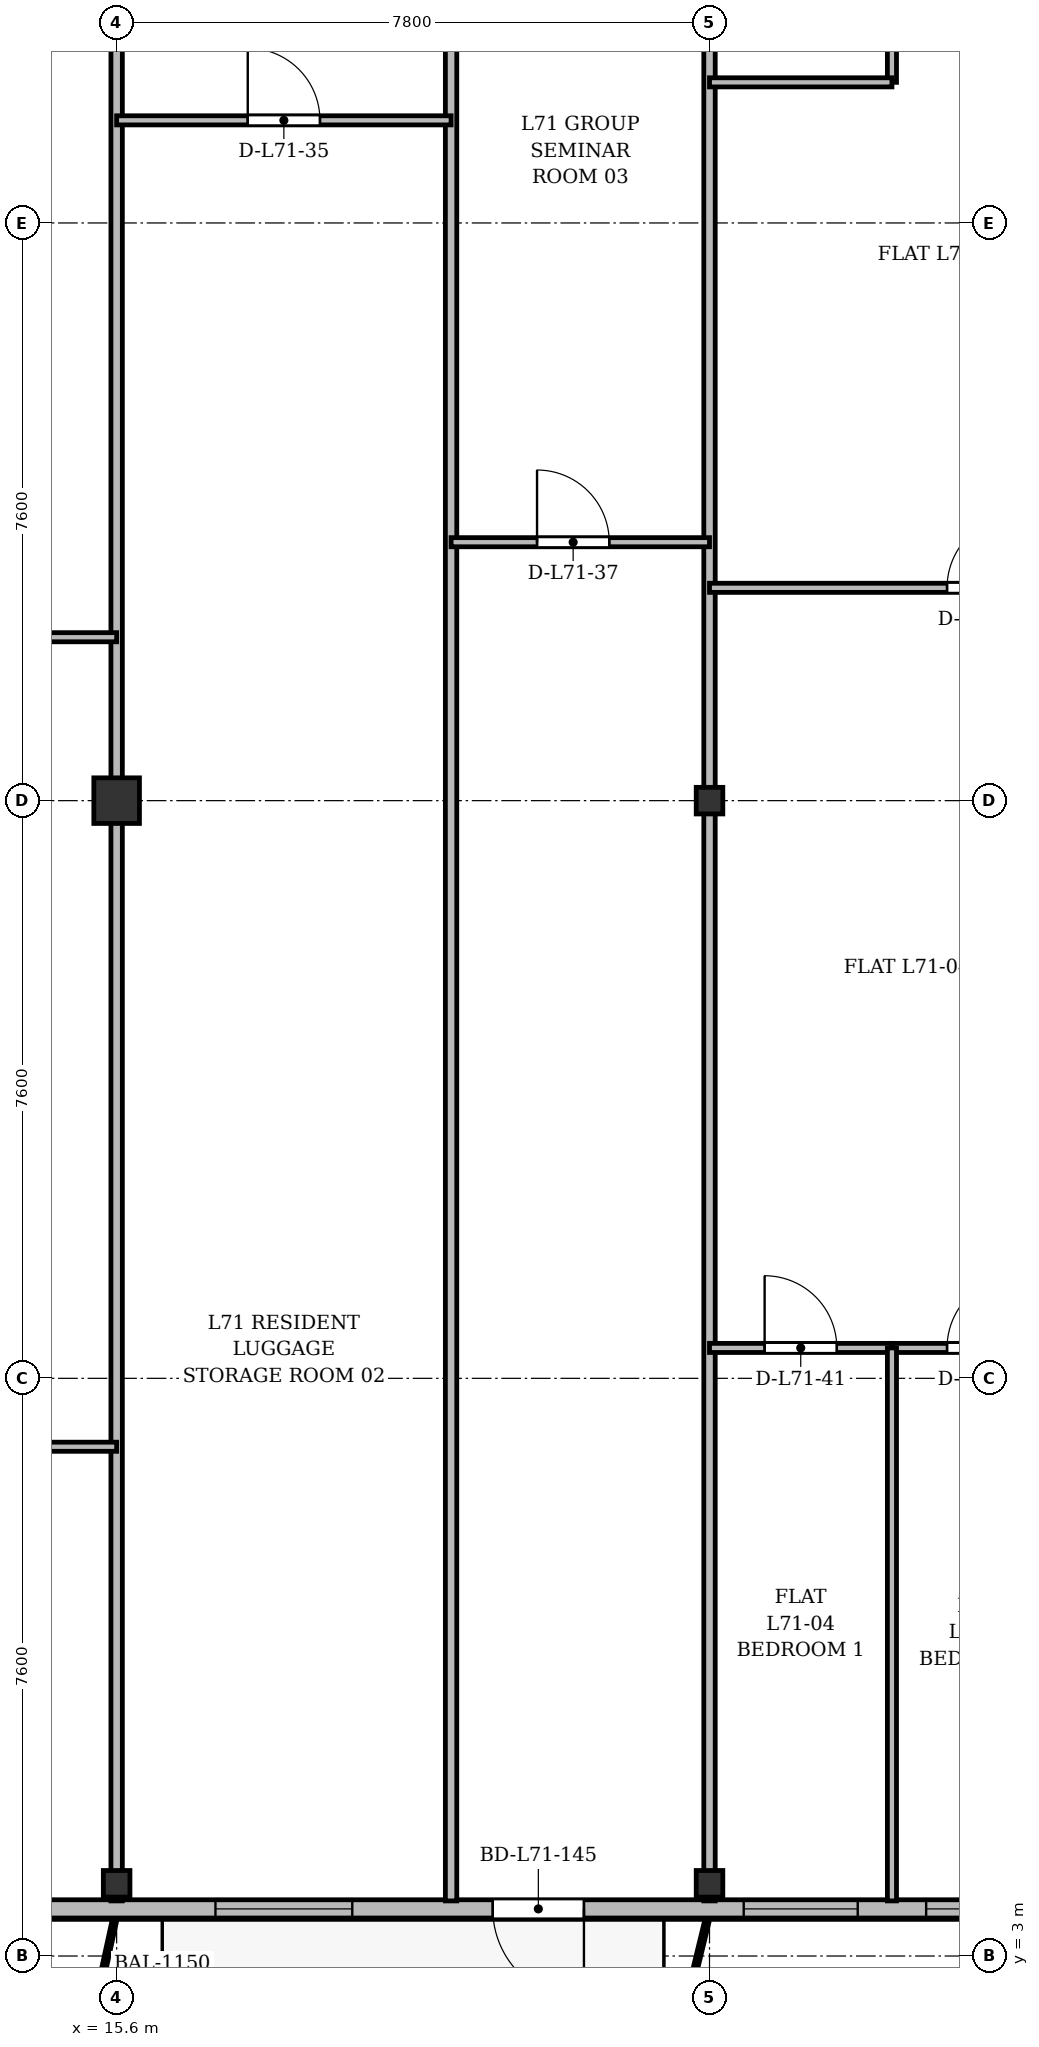
"""IFC4 building model, lengths in metres.
Left out: names, types, materials, properties, quantities, classifications, styles, units other than length and angle.
Written with IfcOpenShell. Run it as: python <this file> out.ifc"""

import sys

from ifc_helpers import new_model, si_unit, direction, frame, frame_2d, origin, origin_2d, place, context, subcontext, project, spatial, rectangle, i_section, extrude, source, transform, mapped, element, fill, save


model = new_model("IFC4")
c1 = context("Model", 3, precision=1e-05, world=origin(), true_north=direction((0.0, 1.0)))
c2 = subcontext(c1, "Body", "Model", "MODEL_VIEW")
j1 = project(units=[si_unit("LENGTHUNIT", "METRE"), si_unit("PLANEANGLEUNIT", "RADIAN")], contexts=[c1])
p1 = place(None, origin())
s1 = spatial("IfcSite", under=j1, at=p1, CompositionType="ELEMENT")
p2 = place(p1, origin())
s2 = spatial("IfcBuilding", under=s1, at=p2, CompositionType="ELEMENT")
p3 = place(p2, frame((0.0, 0.0, 273.9)))
s3 = spatial("IfcBuildingStorey", under=s2, at=p3, CompositionType="ELEMENT", Elevation=273.9)
m1 = source(origin(), c2, "Body", "SweptSolid", [
    extrude(i_section(OverallWidth=0.35, OverallDepth=0.35, WebThickness=0.018, FlangeThickness=0.028, at=origin_2d()), origin(), (0.0, 0.0, 1.0), 3.6),
])
p4 = place(p3, frame((15.6, 3.95, 0.0), z_axis=(0.0, 0.0, 1.0), x_axis=(1.0, 0.0, 0.0)))
e1 = element("IfcColumn", 1, at=p4, inside=s3, PredefinedType="COLUMN", context=c2, shape_type="MappedRepresentation", body=[
    mapped(m1, transform((0.0, 0.0, 0.0), x_axis=(1.0, 0.0, 0.0), y_axis=(0.0, 1.0, 0.0), z_axis=(0.0, 0.0, 1.0), scale=1.0)),
])
m2 = source(origin(), c2, "Body", "SweptSolid", [
    extrude(rectangle(XDim=0.6, YDim=0.6, at=origin_2d()), origin(), (0.0, 0.0, 1.0), 3.6),
])
p5 = place(p3, frame((15.6, 18.2, 0.0), z_axis=(0.0, 0.0, 1.0), x_axis=(1.0, 0.0, 0.0)))
e2 = element("IfcColumn", 2, at=p5, inside=s3, PredefinedType="COLUMN", context=c2, shape_type="MappedRepresentation", body=[
    mapped(m2, transform((0.0, 0.0, 0.0), x_axis=(1.0, 0.0, 0.0), y_axis=(0.0, 1.0, 0.0), z_axis=(0.0, 0.0, 1.0), scale=1.0)),
])
for number, where, z_axis, x_axis in (
    (3, (23.4, 3.95, 0.0), (0.0, 0.0, 1.0), (1.0, 0.0, 0.0)),
    (4, (23.4, 18.2, 0.0), (0.0, 0.0, 1.0), (1.0, 0.0, 0.0)),
):
    element("IfcColumn", number, at=place(p3, frame(where, z_axis=z_axis, x_axis=x_axis)), inside=s3, PredefinedType="COLUMN", context=c2, shape_type="MappedRepresentation", body=[
        mapped(m1, transform((0.0, 0.0, 0.0), x_axis=(1.0, 0.0, 0.0), y_axis=(0.0, 1.0, 0.0), z_axis=(0.0, 0.0, 1.0), scale=1.0)),
    ])
p6 = place(p3, frame((63.2, 3.62, 0.0), z_axis=(0.0, 0.0, 1.0), x_axis=(-1.0, 0.0, 0.0)))
e5 = element("IfcWall", 5, at=p6, inside=s3, PredefinedType="SOLIDWALL", context=c2, shape_type="SweptSolid", body=[
    extrude(rectangle(XDim=52.0, YDim=0.24, at=frame_2d((26.0, 0.0))), origin(), (0.0, 0.0, 1.0), 3.37),
])
p7 = place(p6, frame((1.145, 0.0, 0.9)))
e6 = element("IfcOpeningElement", 6, at=p7, cuts=e5, PredefinedType="OPENING", context=c2, shape_type="SweptSolid", body=[
    extrude(rectangle(XDim=2.2, YDim=1.8, at=frame_2d((1.1, 0.9))), frame((0.0, 0.13, 0.0), z_axis=(0.0, -1.0, 0.0), x_axis=(1.0, 0.0, 0.0)), (0.0, 0.0, 1.0), 0.26),
])
p8 = place(p6, frame((5.45, 0.0, 0.9)))
e7 = element("IfcOpeningElement", 7, at=p8, cuts=e5, PredefinedType="OPENING", context=c2, shape_type="SweptSolid", body=[
    extrude(rectangle(XDim=1.5, YDim=1.75, at=frame_2d((0.75, 0.875))), frame((0.0, 0.13, 0.0), z_axis=(0.0, -1.0, 0.0), x_axis=(1.0, 0.0, 0.0)), (0.0, 0.0, 1.0), 0.26),
])
p9 = place(p6, frame((9.1, 0.0, 0.9)))
e8 = element("IfcOpeningElement", 8, at=p9, cuts=e5, PredefinedType="OPENING", context=c2, shape_type="SweptSolid", body=[
    extrude(rectangle(XDim=2.0, YDim=1.95, at=frame_2d((1.0, 0.975))), frame((0.0, 0.13, 0.0), z_axis=(0.0, -1.0, 0.0), x_axis=(1.0, 0.0, 0.0)), (0.0, 0.0, 1.0), 0.26),
])
p10 = place(p6, frame((14.017, 0.0, 0.0)))
e9 = element("IfcOpeningElement", 9, at=p10, cuts=e5, PredefinedType="OPENING", context=c2, shape_type="SweptSolid", body=[
    extrude(rectangle(XDim=1.2, YDim=2.2, at=frame_2d((0.6, 1.1))), frame((0.0, 0.13, 0.0), z_axis=(0.0, -1.0, 0.0), x_axis=(1.0, 0.0, 0.0)), (0.0, 0.0, 1.0), 0.26),
])
p11 = place(p6, frame((25.1, 0.0, 0.9)))
e10 = element("IfcOpeningElement", 10, at=p11, cuts=e5, PredefinedType="OPENING", context=c2, shape_type="SweptSolid", body=[
    extrude(rectangle(XDim=1.8, YDim=1.8, at=frame_2d((0.9, 0.9))), frame((0.0, 0.13, 0.0), z_axis=(0.0, -1.0, 0.0), x_axis=(1.0, 0.0, 0.0)), (0.0, 0.0, 1.0), 0.26),
])
p12 = place(p6, frame((33.05, 0.0, 0.9)))
e11 = element("IfcOpeningElement", 11, at=p12, cuts=e5, PredefinedType="OPENING", context=c2, shape_type="SweptSolid", body=[
    extrude(rectangle(XDim=1.5, YDim=1.75, at=frame_2d((0.75, 0.875))), frame((0.0, 0.13, 0.0), z_axis=(0.0, -1.0, 0.0), x_axis=(1.0, 0.0, 0.0)), (0.0, 0.0, 1.0), 0.26),
])
p13 = place(p6, frame((35.45, 0.0, 0.9)))
e12 = element("IfcOpeningElement", 12, at=p13, cuts=e5, PredefinedType="OPENING", context=c2, shape_type="SweptSolid", body=[
    extrude(rectangle(XDim=1.5, YDim=1.75, at=frame_2d((0.75, 0.875))), frame((0.0, 0.13, 0.0), z_axis=(0.0, -1.0, 0.0), x_axis=(1.0, 0.0, 0.0)), (0.0, 0.0, 1.0), 0.26),
])
p14 = place(p6, frame((37.85, 0.0, 0.9)))
e13 = element("IfcOpeningElement", 13, at=p14, cuts=e5, PredefinedType="OPENING", context=c2, shape_type="SweptSolid", body=[
    extrude(rectangle(XDim=1.5, YDim=1.75, at=frame_2d((0.75, 0.875))), frame((0.0, 0.13, 0.0), z_axis=(0.0, -1.0, 0.0), x_axis=(1.0, 0.0, 0.0)), (0.0, 0.0, 1.0), 0.26),
])
p15 = place(p6, frame((41.452, 0.0, 0.0)))
e14 = element("IfcOpeningElement", 14, at=p15, cuts=e5, PredefinedType="OPENING", context=c2, shape_type="SweptSolid", body=[
    extrude(rectangle(XDim=1.2, YDim=2.2, at=frame_2d((0.6, 1.1))), frame((0.0, 0.13, 0.0), z_axis=(0.0, -1.0, 0.0), x_axis=(1.0, 0.0, 0.0)), (0.0, 0.0, 1.0), 0.26),
])
p16 = place(p6, frame((44.5, 0.0, 0.9)))
e15 = element("IfcOpeningElement", 15, at=p16, cuts=e5, PredefinedType="OPENING", context=c2, shape_type="SweptSolid", body=[
    extrude(rectangle(XDim=1.8, YDim=1.8, at=frame_2d((0.9, 0.9))), frame((0.0, 0.13, 0.0), z_axis=(0.0, -1.0, 0.0), x_axis=(1.0, 0.0, 0.0)), (0.0, 0.0, 1.0), 0.26),
])
p17 = place(p6, frame((48.655, 0.0, 0.9)))
e16 = element("IfcOpeningElement", 16, at=p17, cuts=e5, PredefinedType="OPENING", context=c2, shape_type="SweptSolid", body=[
    extrude(rectangle(XDim=2.2, YDim=1.8, at=frame_2d((1.1, 0.9))), frame((0.0, 0.13, 0.0), z_axis=(0.0, -1.0, 0.0), x_axis=(1.0, 0.0, 0.0)), (0.0, 0.0, 1.0), 0.26),
])
p18 = place(p3, frame((15.6, 3.725, 0.0), z_axis=(0.0, 0.0, 1.0), x_axis=(0.0, 1.0, 0.0)))
e17 = element("IfcWall", 17, at=p18, inside=s3, PredefinedType="PARTITIONING", context=c2, shape_type="SweptSolid", body=[
    extrude(rectangle(XDim=27.275, YDim=0.15, at=frame_2d((13.637, 0.0))), origin(), (0.0, 0.0, 1.0), 2.87),
])
p19 = place(p3, frame((20.0, 3.725, 0.0), z_axis=(0.0, 0.0, 1.0), x_axis=(0.0, 1.0, 0.0)))
e18 = element("IfcWall", 18, at=p19, inside=s3, PredefinedType="PARTITIONING", context=c2, shape_type="SweptSolid", body=[
    extrude(rectangle(XDim=27.275, YDim=0.15, at=frame_2d((13.637, 0.0))), origin(), (0.0, 0.0, 1.0), 2.92),
])
p20 = place(p3, frame((23.4, 3.725, 0.0), z_axis=(0.0, 0.0, 1.0), x_axis=(0.0, 1.0, 0.0)))
e19 = element("IfcWall", 19, at=p20, inside=s3, PredefinedType="PARTITIONING", context=c2, shape_type="SweptSolid", body=[
    extrude(rectangle(XDim=27.275, YDim=0.15, at=frame_2d((13.637, 0.0))), origin(), (0.0, 0.0, 1.0), 2.87),
])
p21 = place(p3, frame((8.44, 20.35, 0.0), z_axis=(0.0, 0.0, 1.0), x_axis=(1.0, 0.0, 0.0)))
e20 = element("IfcWall", 20, at=p21, inside=s3, PredefinedType="PARTITIONING", context=c2, shape_type="SweptSolid", body=[
    extrude(rectangle(XDim=7.16, YDim=0.12, at=frame_2d((3.58, 0.0))), origin(), (0.0, 0.0, 1.0), 2.87),
])
p22 = place(p21, frame((3.105, 0.0, 0.0)))
e21 = element("IfcOpeningElement", 21, at=p22, cuts=e20, PredefinedType="OPENING", context=c2, shape_type="SweptSolid", body=[
    extrude(rectangle(XDim=0.95, YDim=2.15, at=frame_2d((0.475, 1.075))), frame((0.0, 0.07, 0.0), z_axis=(0.0, -1.0, 0.0), x_axis=(1.0, 0.0, 0.0)), (0.0, 0.0, 1.0), 0.14),
])
p23 = place(p3, frame((8.44, 9.7, 0.0), z_axis=(0.0, 0.0, 1.0), x_axis=(1.0, 0.0, 0.0)))
e22 = element("IfcWall", 22, at=p23, inside=s3, PredefinedType="PARTITIONING", context=c2, shape_type="SweptSolid", body=[
    extrude(rectangle(XDim=7.16, YDim=0.12, at=frame_2d((3.58, 0.0))), origin(), (0.0, 0.0, 1.0), 2.87),
])
p24 = place(p23, frame((3.105, 0.0, 0.0)))
e23 = element("IfcOpeningElement", 23, at=p24, cuts=e22, PredefinedType="OPENING", context=c2, shape_type="SweptSolid", body=[
    extrude(rectangle(XDim=0.95, YDim=2.15, at=frame_2d((0.475, 1.075))), frame((0.0, 0.07, 0.0), z_axis=(0.0, -1.0, 0.0), x_axis=(1.0, 0.0, 0.0)), (0.0, 0.0, 1.0), 0.14),
])
p25 = place(p3, frame((15.6, 27.15, 0.0), z_axis=(0.0, 0.0, 1.0), x_axis=(1.0, 0.0, 0.0)))
e24 = element("IfcWall", 24, at=p25, inside=s3, PredefinedType="PARTITIONING", context=c2, shape_type="SweptSolid", body=[
    extrude(rectangle(XDim=4.4, YDim=0.12, at=frame_2d((2.2, 0.0))), origin(), (0.0, 0.0, 1.0), 2.87),
])
p26 = place(p25, frame((1.725, 0.0, 0.0)))
e25 = element("IfcOpeningElement", 25, at=p26, cuts=e24, PredefinedType="OPENING", context=c2, shape_type="SweptSolid", body=[
    extrude(rectangle(XDim=0.95, YDim=2.15, at=frame_2d((0.475, 1.075))), frame((0.0, 0.07, 0.0), z_axis=(0.0, -1.0, 0.0), x_axis=(1.0, 0.0, 0.0)), (0.0, 0.0, 1.0), 0.14),
])
p27 = place(p3, frame((20.0, 21.6, 0.0), z_axis=(0.0, 0.0, 1.0), x_axis=(1.0, 0.0, 0.0)))
e26 = element("IfcWall", 26, at=p27, inside=s3, PredefinedType="PARTITIONING", context=c2, shape_type="SweptSolid", body=[
    extrude(rectangle(XDim=3.4, YDim=0.12, at=frame_2d((1.7, 0.0))), origin(), (0.0, 0.0, 1.0), 2.87),
])
p28 = place(p27, frame((1.131, 0.0, 0.0)))
e27 = element("IfcOpeningElement", 27, at=p28, cuts=e26, PredefinedType="OPENING", context=c2, shape_type="SweptSolid", body=[
    extrude(rectangle(XDim=0.95, YDim=2.15, at=frame_2d((0.475, 1.075))), frame((0.0, 0.07, 0.0), z_axis=(0.0, -1.0, 0.0), x_axis=(1.0, 0.0, 0.0)), (0.0, 0.0, 1.0), 0.14),
])
p29 = place(p3, frame((23.4, 21.0, 0.0), z_axis=(0.0, 0.0, 1.0), x_axis=(1.0, 0.0, 0.0)))
e28 = element("IfcWall", 28, at=p29, inside=s3, PredefinedType="PARTITIONING", context=c2, shape_type="SweptSolid", body=[
    extrude(rectangle(XDim=7.2, YDim=0.12, at=frame_2d((3.6, 0.0))), origin(), (0.0, 0.0, 1.0), 2.87),
])
p30 = place(p29, frame((3.125, 0.0, 0.0)))
e29 = element("IfcOpeningElement", 29, at=p30, cuts=e28, PredefinedType="OPENING", context=c2, shape_type="SweptSolid", body=[
    extrude(rectangle(XDim=0.95, YDim=2.15, at=frame_2d((0.475, 1.075))), frame((0.0, 0.07, 0.0), z_axis=(0.0, -1.0, 0.0), x_axis=(1.0, 0.0, 0.0)), (0.0, 0.0, 1.0), 0.14),
])
p31 = place(p3, frame((25.8, 27.65, 0.0), z_axis=(0.0, 0.0, 1.0), x_axis=(0.0, 1.0, 0.0)))
e30 = element("IfcWall", 30, at=p31, inside=s3, PredefinedType="PARTITIONING", context=c2, shape_type="SweptSolid", body=[
    extrude(rectangle(XDim=3.35, YDim=0.12, at=frame_2d((1.675, 0.0))), origin(), (0.0, 0.0, 1.0), 3.37),
])
p32 = place(p31, frame((0.8, 0.0, 0.0)))
e31 = element("IfcOpeningElement", 31, at=p32, cuts=e30, PredefinedType="OPENING", context=c2, shape_type="SweptSolid", body=[
    extrude(rectangle(XDim=0.85, YDim=2.1, at=frame_2d((0.425, 1.05))), frame((0.0, 0.07, 0.0), z_axis=(0.0, -1.0, 0.0), x_axis=(1.0, 0.0, 0.0)), (0.0, 0.0, 1.0), 0.14),
])
p33 = place(p3, frame((23.4, 27.65, 0.0), z_axis=(0.0, 0.0, 1.0), x_axis=(1.0, 0.0, 0.0)))
e32 = element("IfcWall", 32, at=p33, inside=s3, PredefinedType="PARTITIONING", context=c2, shape_type="SweptSolid", body=[
    extrude(rectangle(XDim=2.4, YDim=0.12, at=frame_2d((1.2, 0.0))), origin(), (0.0, 0.0, 1.0), 2.87),
])
p34 = place(p3, frame((23.4, 11.0, 0.0), z_axis=(0.0, 0.0, 1.0), x_axis=(1.0, 0.0, 0.0)))
e33 = element("IfcWall", 33, at=p34, inside=s3, PredefinedType="PARTITIONING", context=c2, shape_type="SweptSolid", body=[
    extrude(rectangle(XDim=2.4, YDim=0.12, at=frame_2d((1.2, 0.0))), origin(), (0.0, 0.0, 1.0), 2.87),
])
p35 = place(p34, frame((0.725, 0.0, 0.0)))
e34 = element("IfcOpeningElement", 34, at=p35, cuts=e33, PredefinedType="OPENING", context=c2, shape_type="SweptSolid", body=[
    extrude(rectangle(XDim=0.95, YDim=2.15, at=frame_2d((0.475, 1.075))), frame((0.0, 0.07, 0.0), z_axis=(0.0, -1.0, 0.0), x_axis=(1.0, 0.0, 0.0)), (0.0, 0.0, 1.0), 0.14),
])
p36 = place(p3, frame((25.8, 11.0, 0.0), z_axis=(0.0, 0.0, 1.0), x_axis=(1.0, 0.0, 0.0)))
e35 = element("IfcWall", 35, at=p36, inside=s3, PredefinedType="PARTITIONING", context=c2, shape_type="SweptSolid", body=[
    extrude(rectangle(XDim=2.4, YDim=0.12, at=frame_2d((1.2, 0.0))), origin(), (0.0, 0.0, 1.0), 3.07),
])
p37 = place(p36, frame((0.725, 0.0, 0.0)))
e36 = element("IfcOpeningElement", 36, at=p37, cuts=e35, PredefinedType="OPENING", context=c2, shape_type="SweptSolid", body=[
    extrude(rectangle(XDim=0.95, YDim=2.15, at=frame_2d((0.475, 1.075))), frame((0.0, 0.07, 0.0), z_axis=(0.0, -1.0, 0.0), x_axis=(1.0, 0.0, 0.0)), (0.0, 0.0, 1.0), 0.14),
])
p38 = place(p3, frame((25.8, 3.725, 0.0), z_axis=(0.0, 0.0, 1.0), x_axis=(0.0, 1.0, 0.0)))
e37 = element("IfcWall", 37, at=p38, inside=s3, PredefinedType="PARTITIONING", context=c2, shape_type="SweptSolid", body=[
    extrude(rectangle(XDim=7.275, YDim=0.12, at=frame_2d((3.637, 0.0))), origin(), (0.0, 0.0, 1.0), 2.92),
])
m3 = source(origin(), c2, "Body", "SweptSolid", [
    extrude(rectangle(XDim=1.5, YDim=1.75, at=frame_2d((0.75, 0.875))), frame((0.0, 0.03, 0.0), z_axis=(0.0, -1.0, 0.0), x_axis=(1.0, 0.0, 0.0)), (0.0, 0.0, 1.0), 0.06),
])
p39 = place(p13, origin())
e38 = element("IfcWindow", 38, at=p39, inside=s3, PartitioningType="SINGLE_PANEL", PredefinedType="WINDOW", context=c2, shape_type="MappedRepresentation", body=[
    mapped(m3, transform((0.0, 0.0, 0.0), x_axis=(1.0, 0.0, 0.0), y_axis=(0.0, 1.0, 0.0), z_axis=(0.0, 0.0, 1.0), scale=1.0)),
])
fill(e12, e38)
p40 = place(p14, origin())
e39 = element("IfcWindow", 39, at=p40, inside=s3, PartitioningType="SINGLE_PANEL", PredefinedType="WINDOW", context=c2, shape_type="MappedRepresentation", body=[
    mapped(m3, transform((0.0, 0.0, 0.0), x_axis=(1.0, 0.0, 0.0), y_axis=(0.0, 1.0, 0.0), z_axis=(0.0, 0.0, 1.0), scale=1.0)),
])
fill(e13, e39)
m4 = source(origin(), c2, "Body", "SweptSolid", [
    extrude(rectangle(XDim=1.2, YDim=2.2, at=frame_2d((0.6, 1.1))), frame((0.0, 0.025, 0.0), z_axis=(0.0, -1.0, 0.0), x_axis=(1.0, 0.0, 0.0)), (0.0, 0.0, 1.0), 0.05),
])
p41 = place(p15, origin())
e40 = element("IfcDoor", 40, at=p41, inside=s3, OperationType="SINGLE_SWING_LEFT", PredefinedType="DOOR", context=c2, shape_type="MappedRepresentation", body=[
    mapped(m4, transform((0.0, 0.0, 0.0), x_axis=(1.0, 0.0, 0.0), y_axis=(0.0, 1.0, 0.0), z_axis=(0.0, 0.0, 1.0), scale=1.0)),
])
fill(e14, e40)
m5 = source(origin(), c2, "Body", "SweptSolid", [
    extrude(rectangle(XDim=1.8, YDim=1.8, at=frame_2d((0.9, 0.9))), frame((0.0, 0.03, 0.0), z_axis=(0.0, -1.0, 0.0), x_axis=(1.0, 0.0, 0.0)), (0.0, 0.0, 1.0), 0.06),
])
p42 = place(p16, origin())
e41 = element("IfcWindow", 41, at=p42, inside=s3, PartitioningType="SINGLE_PANEL", PredefinedType="WINDOW", context=c2, shape_type="MappedRepresentation", body=[
    mapped(m5, transform((0.0, 0.0, 0.0), x_axis=(1.0, 0.0, 0.0), y_axis=(0.0, 1.0, 0.0), z_axis=(0.0, 0.0, 1.0), scale=1.0)),
])
fill(e15, e41)
m6 = source(origin(), c2, "Body", "SweptSolid", [
    extrude(rectangle(XDim=0.95, YDim=2.15, at=frame_2d((0.475, 1.075))), frame((0.0, 0.025, 0.0), z_axis=(0.0, -1.0, 0.0), x_axis=(1.0, 0.0, 0.0)), (0.0, 0.0, 1.0), 0.05),
])
p43 = place(p26, origin())
e42 = element("IfcDoor", 42, at=p43, inside=s3, OperationType="SINGLE_SWING_LEFT", PredefinedType="DOOR", context=c2, shape_type="MappedRepresentation", body=[
    mapped(m6, transform((0.0, 0.0, 0.0), x_axis=(1.0, 0.0, 0.0), y_axis=(0.0, 1.0, 0.0), z_axis=(0.0, 0.0, 1.0), scale=1.0)),
])
fill(e25, e42)
p44 = place(p28, origin())
e43 = element("IfcDoor", 43, at=p44, inside=s3, OperationType="SINGLE_SWING_LEFT", PredefinedType="DOOR", context=c2, shape_type="MappedRepresentation", body=[
    mapped(m6, transform((0.0, 0.0, 0.0), x_axis=(1.0, 0.0, 0.0), y_axis=(0.0, 1.0, 0.0), z_axis=(0.0, 0.0, 1.0), scale=1.0)),
])
fill(e27, e43)
p45 = place(p30, origin())
e44 = element("IfcDoor", 44, at=p45, inside=s3, OperationType="SINGLE_SWING_RIGHT", PredefinedType="DOOR", context=c2, shape_type="MappedRepresentation", body=[
    mapped(m6, transform((0.0, 0.0, 0.0), x_axis=(1.0, 0.0, 0.0), y_axis=(0.0, 1.0, 0.0), z_axis=(0.0, 0.0, 1.0), scale=1.0)),
])
fill(e29, e44)
p46 = place(p35, origin())
e45 = element("IfcDoor", 45, at=p46, inside=s3, OperationType="SINGLE_SWING_LEFT", PredefinedType="DOOR", context=c2, shape_type="MappedRepresentation", body=[
    mapped(m6, transform((0.0, 0.0, 0.0), x_axis=(1.0, 0.0, 0.0), y_axis=(0.0, 1.0, 0.0), z_axis=(0.0, 0.0, 1.0), scale=1.0)),
])
fill(e34, e45)
p47 = place(p37, origin())
e46 = element("IfcDoor", 46, at=p47, inside=s3, OperationType="SINGLE_SWING_RIGHT", PredefinedType="DOOR", context=c2, shape_type="MappedRepresentation", body=[
    mapped(m6, transform((0.0, 0.0, 0.0), x_axis=(1.0, 0.0, 0.0), y_axis=(0.0, 1.0, 0.0), z_axis=(0.0, 0.0, 1.0), scale=1.0)),
])
fill(e36, e46)
save(model, sys.argv[1])
